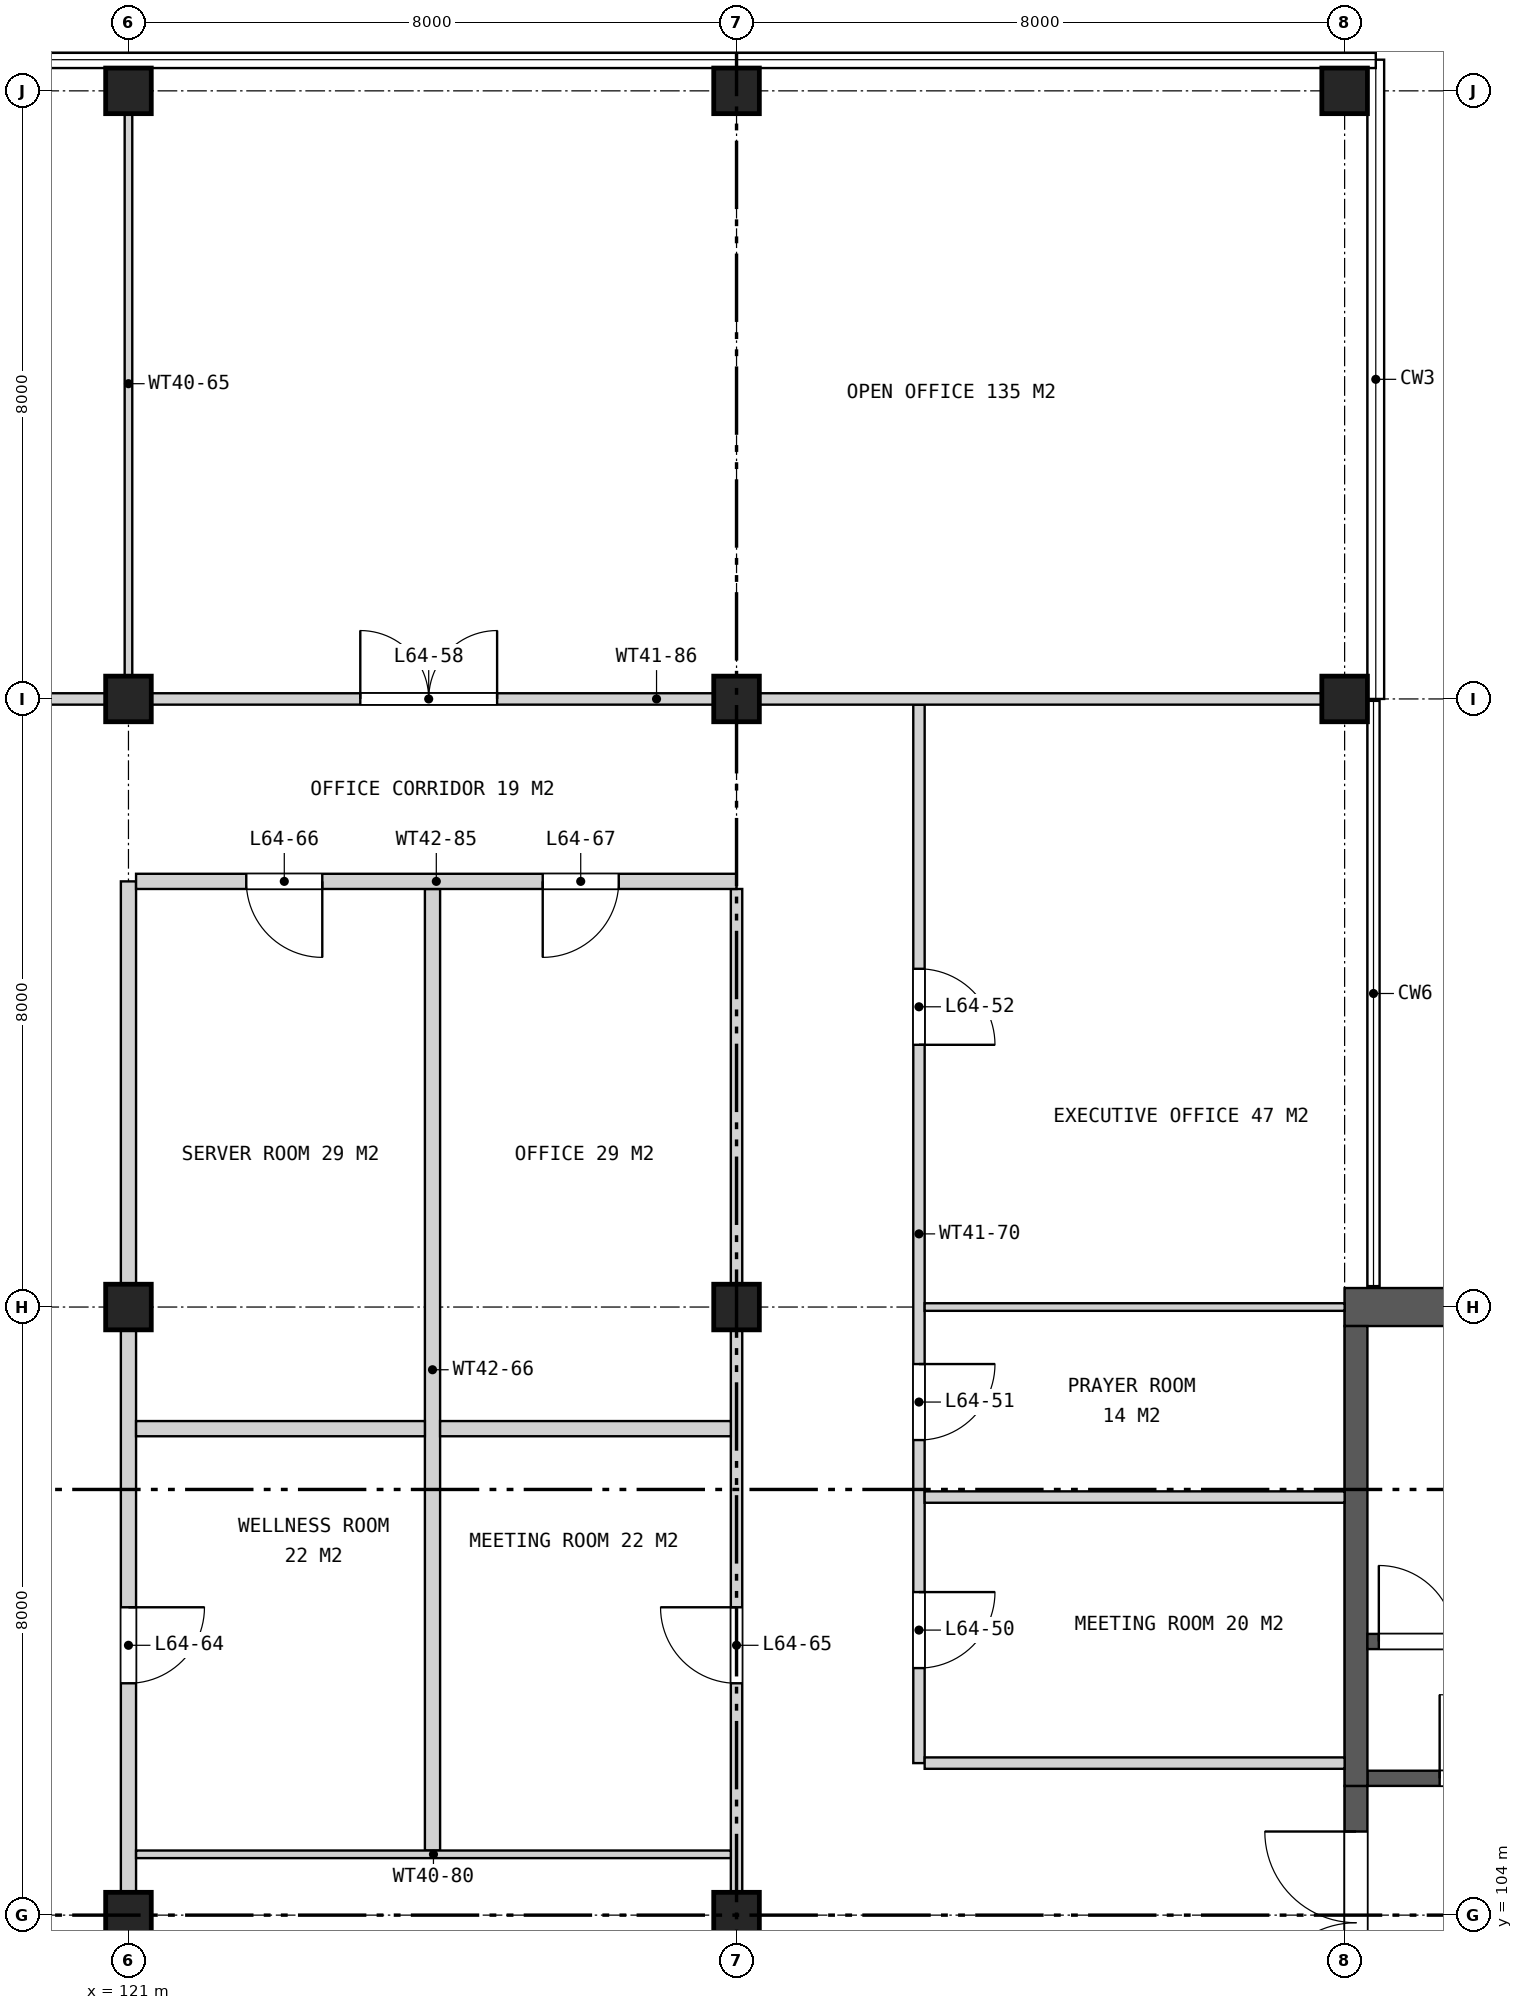
"""IFC4 building model, lengths in metres.
Left out: names, types, materials, properties, quantities, classifications, styles, units other than length and angle.
Written with IfcOpenShell. Run it as: python <this file> out.ifc"""

import sys

from ifc_helpers import new_model, si_unit, direction, frame, frame_2d, origin, origin_2d, place, context, subcontext, project, spatial, rectangle, extrude, element, fill, save


model = new_model("IFC4")
c1 = context("Model", 3, precision=1e-05, world=origin(), true_north=direction((0.0, 1.0)))
c2 = subcontext(c1, "Body", "Model", "MODEL_VIEW")
j1 = project(units=[si_unit("LENGTHUNIT", "METRE"), si_unit("PLANEANGLEUNIT", "RADIAN")], contexts=[c1])
p1 = place(None, origin())
s1 = spatial("IfcSite", under=j1, at=p1, CompositionType="ELEMENT")
p2 = place(p1, origin())
s2 = spatial("IfcBuilding", under=s1, at=p2, CompositionType="ELEMENT")
p3 = place(p2, frame((0.0, 0.0, 295.5)))
s3 = spatial("IfcBuildingStorey", under=s2, at=p3, CompositionType="ELEMENT", Elevation=295.5)
for number, where, z_axis, x_axis in (
    (1, (121.0, 104.0, 0.0), (0.0, 0.0, 1.0), (1.0, 0.0, 0.0)),
    (2, (121.0, 112.0, 0.0), (0.0, 0.0, 1.0), (1.0, 0.0, 0.0)),
    (3, (121.0, 120.0, 0.0), (0.0, 0.0, 1.0), (1.0, 0.0, 0.0)),
    (4, (121.0, 128.0, 0.0), (0.0, 0.0, 1.0), (1.0, 0.0, 0.0)),
    (5, (129.0, 104.0, 0.0), (0.0, 0.0, 1.0), (1.0, 0.0, 0.0)),
    (6, (129.0, 112.0, 0.0), (0.0, 0.0, 1.0), (1.0, 0.0, 0.0)),
    (7, (129.0, 120.0, 0.0), (0.0, 0.0, 1.0), (1.0, 0.0, 0.0)),
    (8, (129.0, 128.0, 0.0), (0.0, 0.0, 1.0), (1.0, 0.0, 0.0)),
    (9, (137.0, 120.0, 0.0), (0.0, 0.0, 1.0), (1.0, 0.0, 0.0)),
    (10, (137.0, 128.0, 0.0), (0.0, 0.0, 1.0), (1.0, 0.0, 0.0)),
):
    element("IfcColumn", number, at=place(p3, frame(where, z_axis=z_axis, x_axis=x_axis)), inside=s3, PredefinedType="COLUMN", context=c2, shape_type="SweptSolid", body=[
        extrude(rectangle(XDim=0.6, YDim=0.6, at=origin_2d()), origin(), (0.0, 0.0, 1.0), 4.2),
    ])
p4 = place(p3, frame((137.0, 112.0, 0.0), z_axis=(0.0, 0.0, 1.0), x_axis=(1.0, 0.0, 0.0)))
e11 = element("IfcWall", 11, at=p4, inside=s3, PredefinedType="SHEAR", context=c2, shape_type="SweptSolid", body=[
    extrude(rectangle(XDim=7.1, YDim=0.5, at=frame_2d((3.55, 0.0))), origin(), (0.0, 0.0, 1.0), 4.2),
])
p5 = place(p3, frame((137.15, 94.3, 0.0), z_axis=(0.0, 0.0, 1.0), x_axis=(0.0, 1.0, 0.0)))
e12 = element("IfcWall", 12, at=p5, inside=s3, PredefinedType="SHEAR", context=c2, shape_type="SweptSolid", body=[
    extrude(rectangle(XDim=11.4, YDim=0.3, at=frame_2d((5.7, 0.0))), origin(), (0.0, 0.0, 1.0), 4.2),
])
p6 = place(p5, frame((0.6, 0.0, 0.0)))
e13 = element("IfcOpeningElement", 13, at=p6, cuts=e12, PredefinedType="OPENING", context=c2, shape_type="SweptSolid", body=[
    extrude(rectangle(XDim=2.4, YDim=2.4, at=frame_2d((1.2, 1.2))), frame((0.0, 0.16, 0.0), z_axis=(0.0, -1.0, 0.0), x_axis=(1.0, 0.0, 0.0)), (0.0, 0.0, 1.0), 0.32),
])
p7 = place(p5, frame((4.5, 0.0, 0.0)))
e14 = element("IfcOpeningElement", 14, at=p7, cuts=e12, PredefinedType="OPENING", context=c2, shape_type="SweptSolid", body=[
    extrude(rectangle(XDim=2.4, YDim=2.4, at=frame_2d((1.2, 1.2))), frame((0.0, 0.16, 0.0), z_axis=(0.0, -1.0, 0.0), x_axis=(1.0, 0.0, 0.0)), (0.0, 0.0, 1.0), 0.32),
])
p8 = place(p5, frame((8.4, 0.0, 0.0)))
e15 = element("IfcOpeningElement", 15, at=p8, cuts=e12, PredefinedType="OPENING", context=c2, shape_type="SweptSolid", body=[
    extrude(rectangle(XDim=2.4, YDim=2.4, at=frame_2d((1.2, 1.2))), frame((0.0, 0.16, 0.0), z_axis=(0.0, -1.0, 0.0), x_axis=(1.0, 0.0, 0.0)), (0.0, 0.0, 1.0), 0.32),
])
p9 = place(p3, frame((137.3, 105.8, 0.0), z_axis=(0.0, 0.0, 1.0), x_axis=(1.0, 0.0, 0.0)))
e16 = element("IfcWall", 16, at=p9, inside=s3, PredefinedType="SHEAR", context=c2, shape_type="SweptSolid", body=[
    extrude(rectangle(XDim=15.45, YDim=0.2, at=frame_2d((7.725, 0.0))), origin(), (0.0, 0.0, 1.0), 4.2),
])
p10 = place(p9, frame((0.95, 0.0, 0.0)))
e17 = element("IfcOpeningElement", 17, at=p10, cuts=e16, PredefinedType="OPENING", context=c2, shape_type="SweptSolid", body=[
    extrude(rectangle(XDim=1.1, YDim=2.1, at=frame_2d((0.55, 1.05))), frame((0.0, 0.11, 0.0), z_axis=(0.0, -1.0, 0.0), x_axis=(1.0, 0.0, 0.0)), (0.0, 0.0, 1.0), 0.22),
])
p11 = place(p3, frame((137.15, 105.7, 0.0), z_axis=(0.0, 0.0, 1.0), x_axis=(0.0, 1.0, 0.0)))
e18 = element("IfcWall", 18, at=p11, inside=s3, PredefinedType="SHEAR", context=c2, shape_type="SweptSolid", body=[
    extrude(rectangle(XDim=6.05, YDim=0.3, at=frame_2d((3.025, 0.0))), origin(), (0.0, 0.0, 1.0), 4.2),
])
p12 = place(p3, frame((137.3, 107.6, 0.0), z_axis=(0.0, 0.0, 1.0), x_axis=(1.0, 0.0, 0.0)))
e19 = element("IfcWall", 19, at=p12, inside=s3, PredefinedType="SHEAR", context=c2, shape_type="SweptSolid", body=[
    extrude(rectangle(XDim=6.8, YDim=0.2, at=frame_2d((3.4, 0.0))), origin(), (0.0, 0.0, 1.0), 4.2),
])
p13 = place(p12, frame((0.15, 0.0, 0.0)))
e20 = element("IfcOpeningElement", 20, at=p13, cuts=e19, PredefinedType="OPENING", context=c2, shape_type="SweptSolid", body=[
    extrude(rectangle(XDim=1.0, YDim=2.1, at=frame_2d((0.5, 1.05))), frame((0.0, 0.11, 0.0), z_axis=(0.0, -1.0, 0.0), x_axis=(1.0, 0.0, 0.0)), (0.0, 0.0, 1.0), 0.22),
])
p14 = place(p3, frame((121.0, 82.4, 0.0), z_axis=(0.0, 0.0, 1.0), x_axis=(0.0, 1.0, 0.0)))
e21 = element("IfcWall", 21, at=p14, inside=s3, PredefinedType="SOLIDWALL", context=c2, shape_type="SweptSolid", body=[
    extrude(rectangle(XDim=35.2, YDim=0.2, at=frame_2d((17.6, 0.0))), origin(), (0.0, 0.0, 1.0), 3.443),
])
p15 = place(p14, frame((7.45, 0.0, 0.0)))
e22 = element("IfcOpeningElement", 22, at=p15, cuts=e21, PredefinedType="OPENING", context=c2, shape_type="SweptSolid", body=[
    extrude(rectangle(XDim=1.0, YDim=2.1, at=frame_2d((0.5, 1.05))), frame((0.0, 0.11, 0.0), z_axis=(0.0, -1.0, 0.0), x_axis=(1.0, 0.0, 0.0)), (0.0, 0.0, 1.0), 0.22),
])
p16 = place(p14, frame((18.25, 0.0, 0.0)))
e23 = element("IfcOpeningElement", 23, at=p16, cuts=e21, PredefinedType="OPENING", context=c2, shape_type="SweptSolid", body=[
    extrude(rectangle(XDim=1.0, YDim=2.1, at=frame_2d((0.5, 1.05))), frame((0.0, 0.11, 0.0), z_axis=(0.0, -1.0, 0.0), x_axis=(1.0, 0.0, 0.0)), (0.0, 0.0, 1.0), 0.22),
])
p17 = place(p14, frame((24.65, 0.0, 0.0)))
e24 = element("IfcOpeningElement", 24, at=p17, cuts=e21, PredefinedType="OPENING", context=c2, shape_type="SweptSolid", body=[
    extrude(rectangle(XDim=1.0, YDim=2.1, at=frame_2d((0.5, 1.05))), frame((0.0, 0.11, 0.0), z_axis=(0.0, -1.0, 0.0), x_axis=(1.0, 0.0, 0.0)), (0.0, 0.0, 1.0), 0.22),
])
p18 = place(p3, frame((121.0, 120.075, 0.0), z_axis=(0.0, 0.0, 1.0), x_axis=(0.0, 1.0, 0.0)))
e25 = element("IfcWall", 25, at=p18, inside=s3, PredefinedType="PARTITIONING", context=c2, shape_type="SweptSolid", body=[
    extrude(rectangle(XDim=8.145, YDim=0.1, at=frame_2d((4.073, 0.0))), origin(), (0.0, 0.0, 1.0), 3.443),
])
p19 = place(p3, frame((125.0, 104.85, 0.0), z_axis=(0.0, 0.0, 1.0), x_axis=(0.0, 1.0, 0.0)))
e26 = element("IfcWall", 26, at=p19, inside=s3, PredefinedType="SOLIDWALL", context=c2, shape_type="SweptSolid", body=[
    extrude(rectangle(XDim=12.65, YDim=0.2, at=frame_2d((6.325, 0.0))), origin(), (0.0, 0.0, 1.0), 3.443),
])
p20 = place(p3, frame((129.0, 82.4, 0.0), z_axis=(0.0, 0.0, 1.0), x_axis=(0.0, 1.0, 0.0)))
e27 = element("IfcWall", 27, at=p20, inside=s3, PredefinedType="PARTITIONING", context=c2, shape_type="SweptSolid", body=[
    extrude(rectangle(XDim=35.1, YDim=0.15, at=frame_2d((17.55, 0.0))), origin(), (0.0, 0.0, 1.0), 3.443),
])
p21 = place(p20, frame((11.95, 0.0, 0.0)))
e28 = element("IfcOpeningElement", 28, at=p21, cuts=e27, PredefinedType="OPENING", context=c2, shape_type="SweptSolid", body=[
    extrude(rectangle(XDim=1.0, YDim=2.1, at=frame_2d((0.5, 1.05))), frame((0.0, 0.085, 0.0), z_axis=(0.0, -1.0, 0.0), x_axis=(1.0, 0.0, 0.0)), (0.0, 0.0, 1.0), 0.17),
])
p22 = place(p20, frame((24.65, 0.0, 0.0)))
e29 = element("IfcOpeningElement", 29, at=p22, cuts=e27, PredefinedType="OPENING", context=c2, shape_type="SweptSolid", body=[
    extrude(rectangle(XDim=1.0, YDim=2.1, at=frame_2d((0.5, 1.05))), frame((0.0, 0.085, 0.0), z_axis=(0.0, -1.0, 0.0), x_axis=(1.0, 0.0, 0.0)), (0.0, 0.0, 1.0), 0.17),
])
p23 = place(p3, frame((131.4, 106.0, 0.0), z_axis=(0.0, 0.0, 1.0), x_axis=(0.0, 1.0, 0.0)))
e30 = element("IfcWall", 30, at=p23, inside=s3, PredefinedType="PARTITIONING", context=c2, shape_type="SweptSolid", body=[
    extrude(rectangle(XDim=13.925, YDim=0.15, at=frame_2d((6.962, 0.0))), origin(), (0.0, 0.0, 1.0), 3.443),
])
p24 = place(p23, frame((1.25, 0.0, 0.0)))
e31 = element("IfcOpeningElement", 31, at=p24, cuts=e30, PredefinedType="OPENING", context=c2, shape_type="SweptSolid", body=[
    extrude(rectangle(XDim=1.0, YDim=2.1, at=frame_2d((0.5, 1.05))), frame((0.0, 0.085, 0.0), z_axis=(0.0, -1.0, 0.0), x_axis=(1.0, 0.0, 0.0)), (0.0, 0.0, 1.0), 0.17),
])
p25 = place(p23, frame((4.25, 0.0, 0.0)))
e32 = element("IfcOpeningElement", 32, at=p25, cuts=e30, PredefinedType="OPENING", context=c2, shape_type="SweptSolid", body=[
    extrude(rectangle(XDim=1.0, YDim=2.1, at=frame_2d((0.5, 1.05))), frame((0.0, 0.085, 0.0), z_axis=(0.0, -1.0, 0.0), x_axis=(1.0, 0.0, 0.0)), (0.0, 0.0, 1.0), 0.17),
])
p26 = place(p23, frame((9.45, 0.0, 0.0)))
e33 = element("IfcOpeningElement", 33, at=p26, cuts=e30, PredefinedType="OPENING", context=c2, shape_type="SweptSolid", body=[
    extrude(rectangle(XDim=1.0, YDim=2.1, at=frame_2d((0.5, 1.05))), frame((0.0, 0.085, 0.0), z_axis=(0.0, -1.0, 0.0), x_axis=(1.0, 0.0, 0.0)), (0.0, 0.0, 1.0), 0.17),
])
p27 = place(p3, frame((121.1, 104.8, 0.0), z_axis=(0.0, 0.0, 1.0), x_axis=(1.0, 0.0, 0.0)))
e34 = element("IfcWall", 34, at=p27, inside=s3, PredefinedType="PARTITIONING", context=c2, shape_type="SweptSolid", body=[
    extrude(rectangle(XDim=7.825, YDim=0.1, at=frame_2d((3.913, 0.0))), origin(), (0.0, 0.0, 1.0), 3.443),
])
for number, where, z_axis, x_axis in (
    (35, (131.475, 106.0, 0.0), (0.0, 0.0, 1.0), (1.0, 0.0, 0.0)),
    (36, (131.475, 109.5, 0.0), (0.0, 0.0, 1.0), (1.0, 0.0, 0.0)),
):
    element("IfcWall", number, at=place(p3, frame(where, z_axis=z_axis, x_axis=x_axis)), inside=s3, PredefinedType="PARTITIONING", context=c2, shape_type="SweptSolid", body=[
        extrude(rectangle(XDim=5.525, YDim=0.15, at=frame_2d((2.762, 0.0))), origin(), (0.0, 0.0, 1.0), 3.443),
    ])
p28 = place(p3, frame((131.475, 112.0, 0.0), z_axis=(0.0, 0.0, 1.0), x_axis=(1.0, 0.0, 0.0)))
e37 = element("IfcWall", 37, at=p28, inside=s3, PredefinedType="PARTITIONING", context=c2, shape_type="SweptSolid", body=[
    extrude(rectangle(XDim=5.525, YDim=0.1, at=frame_2d((2.762, 0.0))), origin(), (0.0, 0.0, 1.0), 3.443),
])
p29 = place(p3, frame((121.1, 117.6, 0.0), z_axis=(0.0, 0.0, 1.0), x_axis=(1.0, 0.0, 0.0)))
e38 = element("IfcWall", 38, at=p29, inside=s3, PredefinedType="SOLIDWALL", context=c2, shape_type="SweptSolid", body=[
    extrude(rectangle(XDim=7.9, YDim=0.2, at=frame_2d((3.95, 0.0))), origin(), (0.0, 0.0, 1.0), 3.443),
])
p30 = place(p29, frame((1.45, 0.0, 0.0)))
e39 = element("IfcOpeningElement", 39, at=p30, cuts=e38, PredefinedType="OPENING", context=c2, shape_type="SweptSolid", body=[
    extrude(rectangle(XDim=1.0, YDim=2.1, at=frame_2d((0.5, 1.05))), frame((0.0, 0.11, 0.0), z_axis=(0.0, -1.0, 0.0), x_axis=(1.0, 0.0, 0.0)), (0.0, 0.0, 1.0), 0.22),
])
p31 = place(p29, frame((5.35, 0.0, 0.0)))
e40 = element("IfcOpeningElement", 40, at=p31, cuts=e38, PredefinedType="OPENING", context=c2, shape_type="SweptSolid", body=[
    extrude(rectangle(XDim=1.0, YDim=2.1, at=frame_2d((0.5, 1.05))), frame((0.0, 0.11, 0.0), z_axis=(0.0, -1.0, 0.0), x_axis=(1.0, 0.0, 0.0)), (0.0, 0.0, 1.0), 0.22),
])
p32 = place(p3, frame((118.675, 120.0, 0.0), z_axis=(0.0, 0.0, 1.0), x_axis=(1.0, 0.0, 0.0)))
e41 = element("IfcWall", 41, at=p32, inside=s3, PredefinedType="PARTITIONING", context=c2, shape_type="SweptSolid", body=[
    extrude(rectangle(XDim=18.545, YDim=0.15, at=frame_2d((9.272, 0.0))), origin(), (0.0, 0.0, 1.0), 3.443),
])
p33 = place(p32, frame((5.375, 0.0, 0.0)))
e42 = element("IfcOpeningElement", 42, at=p33, cuts=e41, PredefinedType="OPENING", context=c2, shape_type="SweptSolid", body=[
    extrude(rectangle(XDim=1.8, YDim=2.1, at=frame_2d((0.9, 1.05))), frame((0.0, 0.085, 0.0), z_axis=(0.0, -1.0, 0.0), x_axis=(1.0, 0.0, 0.0)), (0.0, 0.0, 1.0), 0.17),
])
p34 = place(p3, frame((121.1, 110.4, 0.0), z_axis=(0.0, 0.0, 1.0), x_axis=(1.0, 0.0, 0.0)))
e43 = element("IfcWall", 43, at=p34, inside=s3, PredefinedType="SOLIDWALL", context=c2, shape_type="SweptSolid", body=[
    extrude(rectangle(XDim=3.8, YDim=0.2, at=frame_2d((1.9, 0.0))), origin(), (0.0, 0.0, 1.0), 3.443),
])
p35 = place(p3, frame((125.1, 110.4, 0.0), z_axis=(0.0, 0.0, 1.0), x_axis=(1.0, 0.0, 0.0)))
e44 = element("IfcWall", 44, at=p35, inside=s3, PredefinedType="SOLIDWALL", context=c2, shape_type="SweptSolid", body=[
    extrude(rectangle(XDim=3.825, YDim=0.2, at=frame_2d((1.913, 0.0))), origin(), (0.0, 0.0, 1.0), 3.443),
])
p36 = place(p8, origin())
e45 = element("IfcDoor", 45, at=p36, inside=s3, OperationType="DOUBLE_DOOR_SINGLE_SWING", PredefinedType="DOOR", context=c2, shape_type="SweptSolid", body=[
    extrude(rectangle(XDim=2.4, YDim=2.4, at=frame_2d((1.2, 1.2))), frame((0.0, 0.025, 0.0), z_axis=(0.0, -1.0, 0.0), x_axis=(1.0, 0.0, 0.0)), (0.0, 0.0, 1.0), 0.05),
])
fill(e15, e45)
p37 = place(p10, origin())
e46 = element("IfcDoor", 46, at=p37, inside=s3, OperationType="SINGLE_SWING_LEFT", PredefinedType="DOOR", context=c2, shape_type="SweptSolid", body=[
    extrude(rectangle(XDim=1.1, YDim=2.1, at=frame_2d((0.55, 1.05))), frame((0.0, 0.025, 0.0), z_axis=(0.0, -1.0, 0.0), x_axis=(1.0, 0.0, 0.0)), (0.0, 0.0, 1.0), 0.05),
])
fill(e17, e46)
p38 = place(p13, origin())
e47 = element("IfcDoor", 47, at=p38, inside=s3, OperationType="SINGLE_SWING_LEFT", PredefinedType="DOOR", context=c2, shape_type="SweptSolid", body=[
    extrude(rectangle(XDim=1.0, YDim=2.1, at=frame_2d((0.5, 1.05))), frame((0.0, 0.025, 0.0), z_axis=(0.0, -1.0, 0.0), x_axis=(1.0, 0.0, 0.0)), (0.0, 0.0, 1.0), 0.05),
])
fill(e20, e47)
p39 = place(p24, frame((1.0, 0.0, 0.0), z_axis=(0.0, 0.0, 1.0), x_axis=(-1.0, 0.0, 0.0)))
e48 = element("IfcDoor", 48, at=p39, inside=s3, OperationType="SINGLE_SWING_LEFT", PredefinedType="DOOR", context=c2, shape_type="SweptSolid", body=[
    extrude(rectangle(XDim=1.0, YDim=2.1, at=frame_2d((0.5, 1.05))), frame((0.0, 0.025, 0.0), z_axis=(0.0, -1.0, 0.0), x_axis=(1.0, 0.0, 0.0)), (0.0, 0.0, 1.0), 0.05),
])
fill(e31, e48)
p40 = place(p25, frame((1.0, 0.0, 0.0), z_axis=(0.0, 0.0, 1.0), x_axis=(-1.0, 0.0, 0.0)))
e49 = element("IfcDoor", 49, at=p40, inside=s3, OperationType="SINGLE_SWING_LEFT", PredefinedType="DOOR", context=c2, shape_type="SweptSolid", body=[
    extrude(rectangle(XDim=1.0, YDim=2.1, at=frame_2d((0.5, 1.05))), frame((0.0, 0.025, 0.0), z_axis=(0.0, -1.0, 0.0), x_axis=(1.0, 0.0, 0.0)), (0.0, 0.0, 1.0), 0.05),
])
fill(e32, e49)
p41 = place(p26, frame((1.0, 0.0, 0.0), z_axis=(0.0, 0.0, 1.0), x_axis=(-1.0, 0.0, 0.0)))
e50 = element("IfcDoor", 50, at=p41, inside=s3, OperationType="SINGLE_SWING_RIGHT", PredefinedType="DOOR", context=c2, shape_type="SweptSolid", body=[
    extrude(rectangle(XDim=1.0, YDim=2.1, at=frame_2d((0.5, 1.05))), frame((0.0, 0.025, 0.0), z_axis=(0.0, -1.0, 0.0), x_axis=(1.0, 0.0, 0.0)), (0.0, 0.0, 1.0), 0.05),
])
fill(e33, e50)
p42 = place(p33, origin())
e51 = element("IfcDoor", 51, at=p42, inside=s3, OperationType="DOUBLE_DOOR_SINGLE_SWING", PredefinedType="DOOR", context=c2, shape_type="SweptSolid", body=[
    extrude(rectangle(XDim=1.8, YDim=2.1, at=frame_2d((0.9, 1.05))), frame((0.0, 0.025, 0.0), z_axis=(0.0, -1.0, 0.0), x_axis=(1.0, 0.0, 0.0)), (0.0, 0.0, 1.0), 0.05),
])
fill(e42, e51)
p43 = place(p17, frame((1.0, 0.0, 0.0), z_axis=(0.0, 0.0, 1.0), x_axis=(-1.0, 0.0, 0.0)))
e52 = element("IfcDoor", 52, at=p43, inside=s3, OperationType="SINGLE_SWING_LEFT", PredefinedType="DOOR", context=c2, shape_type="SweptSolid", body=[
    extrude(rectangle(XDim=1.0, YDim=2.1, at=frame_2d((0.5, 1.05))), frame((0.0, 0.025, 0.0), z_axis=(0.0, -1.0, 0.0), x_axis=(1.0, 0.0, 0.0)), (0.0, 0.0, 1.0), 0.05),
])
fill(e24, e52)
p44 = place(p22, origin())
e53 = element("IfcDoor", 53, at=p44, inside=s3, OperationType="SINGLE_SWING_RIGHT", PredefinedType="DOOR", context=c2, shape_type="SweptSolid", body=[
    extrude(rectangle(XDim=1.0, YDim=2.1, at=frame_2d((0.5, 1.05))), frame((0.0, 0.025, 0.0), z_axis=(0.0, -1.0, 0.0), x_axis=(1.0, 0.0, 0.0)), (0.0, 0.0, 1.0), 0.05),
])
fill(e29, e53)
p45 = place(p30, frame((1.0, 0.0, 0.0), z_axis=(0.0, 0.0, 1.0), x_axis=(-1.0, 0.0, 0.0)))
e54 = element("IfcDoor", 54, at=p45, inside=s3, OperationType="SINGLE_SWING_LEFT", PredefinedType="DOOR", context=c2, shape_type="SweptSolid", body=[
    extrude(rectangle(XDim=1.0, YDim=2.1, at=frame_2d((0.5, 1.05))), frame((0.0, 0.025, 0.0), z_axis=(0.0, -1.0, 0.0), x_axis=(1.0, 0.0, 0.0)), (0.0, 0.0, 1.0), 0.05),
])
fill(e39, e54)
p46 = place(p31, frame((1.0, 0.0, 0.0), z_axis=(0.0, 0.0, 1.0), x_axis=(-1.0, 0.0, 0.0)))
e55 = element("IfcDoor", 55, at=p46, inside=s3, OperationType="SINGLE_SWING_RIGHT", PredefinedType="DOOR", context=c2, shape_type="SweptSolid", body=[
    extrude(rectangle(XDim=1.0, YDim=2.1, at=frame_2d((0.5, 1.05))), frame((0.0, 0.025, 0.0), z_axis=(0.0, -1.0, 0.0), x_axis=(1.0, 0.0, 0.0)), (0.0, 0.0, 1.0), 0.05),
])
fill(e40, e55)
save(model, sys.argv[1])
